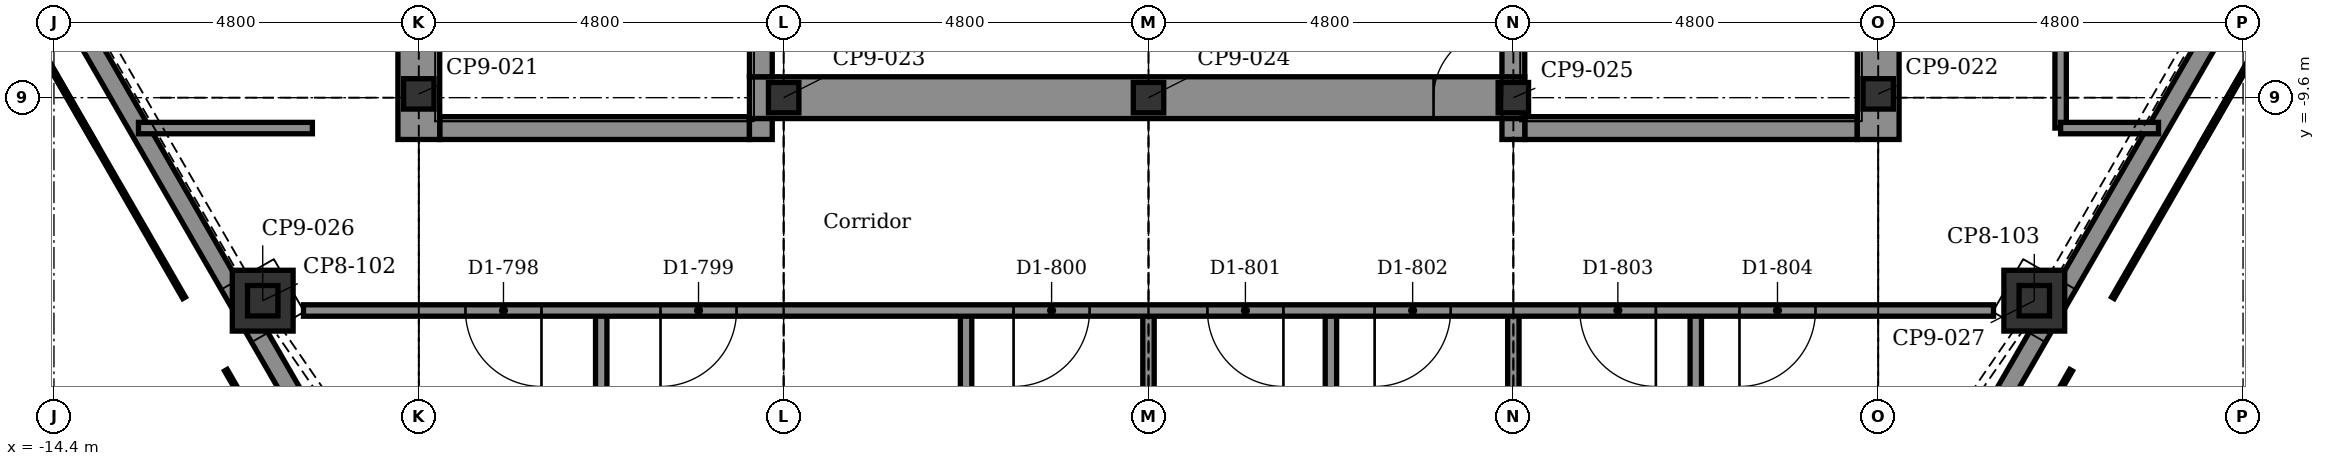
"""IFC4 building model, lengths in metres.
Left out: names, types, materials, properties, quantities, classifications, styles, units other than length and angle.
Written with IfcOpenShell. Run it as: python <this file> out.ifc"""

import sys

from ifc_helpers import new_model, si_unit, direction, frame, frame_2d, origin, origin_2d, place, context, subcontext, project, spatial, polyline, rectangle, hollow_rectangle, outline, extrude, element, fill, save


model = new_model("IFC4")
c1 = context("Model", 3, precision=1e-05, world=origin(), true_north=direction((0.0, 1.0)))
c2 = subcontext(c1, "Body", "Model", "MODEL_VIEW")
j1 = project(units=[si_unit("LENGTHUNIT", "METRE"), si_unit("PLANEANGLEUNIT", "RADIAN")], contexts=[c1])
p1 = place(None, origin())
s1 = spatial("IfcSite", under=j1, at=p1, CompositionType="ELEMENT")
p2 = place(p1, origin())
s2 = spatial("IfcBuilding", under=s1, at=p2, CompositionType="ELEMENT")
p3 = place(p2, frame((0.0, 0.0, 301.9)))
s3 = spatial("IfcBuildingStorey", under=s2, at=p3, CompositionType="ELEMENT", Elevation=301.9)
for number, where, z_axis, x_axis in (
    (1, (11.654, -12.271, -0.3), (0.0, 0.0, 1.0), (0.5, 0.866, 0.0)),
    (2, (-11.654, -12.271, -0.3), (0.0, 0.0, 1.0), (0.866, 0.5, 0.0)),
):
    element("IfcColumn", number, at=place(p3, frame(where, z_axis=z_axis, x_axis=x_axis)), inside=s3, PredefinedType="COLUMN", context=c2, shape_type="SweptSolid", body=[
        extrude(rectangle(XDim=0.8, YDim=0.8, at=origin_2d()), origin(), (0.0, 0.0, 1.0), 5.3),
    ])
p4 = place(p3, frame((-9.325, -10.0, -0.3), z_axis=(0.0, 0.0, 1.0), x_axis=(1.0, 0.0, 0.0)))
e3 = element("IfcWall", 3, at=p4, inside=s3, PredefinedType="STANDARD", context=c2, shape_type="SweptSolid", body=[
    extrude(rectangle(XDim=4.075, YDim=0.3, at=frame_2d((2.038, 0.0))), origin(), (0.0, 0.0, 1.0), 5.3),
])
p5 = place(p3, frame((4.95, -10.0, -0.3), z_axis=(0.0, 0.0, 1.0), x_axis=(1.0, 0.0, 0.0)))
e4 = element("IfcWall", 4, at=p5, inside=s3, PredefinedType="STANDARD", context=c2, shape_type="SweptSolid", body=[
    extrude(rectangle(XDim=4.375, YDim=0.3, at=frame_2d((2.188, 0.0))), origin(), (0.0, 0.0, 1.0), 5.3),
])
p6 = place(p3, frame((-5.25, -9.6, -0.3), z_axis=(0.0, 0.0, 1.0), x_axis=(1.0, 0.0, 0.0)))
e5 = element("IfcWall", 5, at=p6, inside=s3, PredefinedType="SHEAR", context=c2, shape_type="SweptSolid", body=[
    extrude(rectangle(XDim=10.2, YDim=0.55, at=frame_2d((5.1, 0.0))), origin(), (0.0, 0.0, 1.0), 5.3),
])
p7 = place(p6, frame((9.0, 0.0, 0.3)))
e6 = element("IfcOpeningElement", 6, at=p7, cuts=e5, PredefinedType="OPENING", context=c2, shape_type="SweptSolid", body=[
    extrude(rectangle(XDim=0.9, YDim=2.1, at=frame_2d((0.45, 1.05))), frame((0.0, 0.285, 0.0), z_axis=(0.0, -1.0, 0.0), x_axis=(1.0, 0.0, 0.0)), (0.0, 0.0, 1.0), 0.57),
])
p8 = place(p3, frame((-9.6, -10.15, -0.3), z_axis=(0.0, 0.0, 1.0), x_axis=(0.0, 1.0, 0.0)))
e7 = element("IfcWall", 7, at=p8, inside=s3, PredefinedType="SHEAR", context=c2, shape_type="SweptSolid", body=[
    extrude(rectangle(XDim=7.6, YDim=0.55, at=frame_2d((3.8, 0.0))), origin(), (0.0, 0.0, 1.0), 5.3),
])
p9 = place(p3, frame((-5.1, -10.15, -0.3), z_axis=(0.0, 0.0, 1.0), x_axis=(0.0, 1.0, 0.0)))
e8 = element("IfcWall", 8, at=p9, inside=s3, PredefinedType="STANDARD", context=c2, shape_type="SweptSolid", body=[
    extrude(rectangle(XDim=0.275, YDim=0.3, at=frame_2d((0.137, 0.0))), origin(), (0.0, 0.0, 1.0), 5.3),
])
p10 = place(p3, frame((-5.1, -9.325, -0.3), z_axis=(0.0, 0.0, 1.0), x_axis=(0.0, 1.0, 0.0)))
e9 = element("IfcWall", 9, at=p10, inside=s3, PredefinedType="STANDARD", context=c2, shape_type="SweptSolid", body=[
    extrude(rectangle(XDim=7.075, YDim=0.3, at=frame_2d((3.538, 0.0))), origin(), (0.0, 0.0, 1.0), 5.3),
])
p11 = place(p10, frame((3.875, 0.0, 0.3)))
e10 = element("IfcOpeningElement", 10, at=p11, cuts=e9, PredefinedType="OPENING", context=c2, shape_type="SweptSolid", body=[
    extrude(rectangle(XDim=1.2, YDim=2.1, at=frame_2d((0.6, 1.05))), frame((0.0, 0.16, 0.0), z_axis=(0.0, -1.0, 0.0), x_axis=(1.0, 0.0, 0.0)), (0.0, 0.0, 1.0), 0.32),
])
p12 = place(p3, frame((4.8, -10.15, -0.3), z_axis=(0.0, 0.0, 1.0), x_axis=(0.0, 1.0, 0.0)))
e11 = element("IfcWall", 11, at=p12, inside=s3, PredefinedType="STANDARD", context=c2, shape_type="SweptSolid", body=[
    extrude(rectangle(XDim=0.275, YDim=0.3, at=frame_2d((0.137, 0.0))), origin(), (0.0, 0.0, 1.0), 5.3),
])
p13 = place(p3, frame((4.8, -9.325, -0.3), z_axis=(0.0, 0.0, 1.0), x_axis=(0.0, 1.0, 0.0)))
e12 = element("IfcWall", 12, at=p13, inside=s3, PredefinedType="STANDARD", context=c2, shape_type="SweptSolid", body=[
    extrude(rectangle(XDim=7.075, YDim=0.3, at=frame_2d((3.538, 0.0))), origin(), (0.0, 0.0, 1.0), 5.3),
])
p14 = place(p13, frame((3.875, 0.0, 0.3)))
e13 = element("IfcOpeningElement", 13, at=p14, cuts=e12, PredefinedType="OPENING", context=c2, shape_type="SweptSolid", body=[
    extrude(rectangle(XDim=1.2, YDim=2.1, at=frame_2d((0.6, 1.05))), frame((0.0, 0.16, 0.0), z_axis=(0.0, -1.0, 0.0), x_axis=(1.0, 0.0, 0.0)), (0.0, 0.0, 1.0), 0.32),
])
p15 = place(p3, frame((9.6, -10.15, -0.3), z_axis=(0.0, 0.0, 1.0), x_axis=(0.0, 1.0, 0.0)))
e14 = element("IfcWall", 14, at=p15, inside=s3, PredefinedType="SHEAR", context=c2, shape_type="SweptSolid", body=[
    extrude(rectangle(XDim=20.075, YDim=0.55, at=frame_2d((10.038, 0.0))), origin(), (0.0, 0.0, 1.0), 5.3),
])
for number, where, z_axis, x_axis in (
    (15, (11.654, -12.271, 5.0), (0.0, 0.0, 1.0), (1.0, 0.0, 0.0)),
    (16, (-11.654, -12.271, 5.0), (0.0, 0.0, 1.0), (1.0, 0.0, 0.0)),
):
    element("IfcColumn", number, at=place(p3, frame(where, z_axis=z_axis, x_axis=x_axis)), inside=s3, PredefinedType="COLUMN", context=c2, shape_type="SweptSolid", body=[
        extrude(hollow_rectangle(XDim=0.4, YDim=0.4, WallThickness=0.02, at=origin_2d()), origin(), (0.0, 0.0, 1.0), 2.178),
    ])
p16 = place(p3, frame((-9.6, -9.55, 5.0), z_axis=(0.0, 0.0, 1.0), x_axis=(1.0, 0.0, 0.0)))
e17 = element("IfcColumn", 17, at=p16, inside=s3, PredefinedType="COLUMN", context=c2, shape_type="SweptSolid", body=[
    extrude(hollow_rectangle(XDim=0.4, YDim=0.4, WallThickness=0.02, at=origin_2d()), origin(), (0.0, 0.0, 1.0), 3.774),
])
for number, where, z_axis, x_axis in (
    (18, (-4.8, -9.6, 5.0), (0.0, 0.0, 1.0), (1.0, 0.0, 0.0)),
    (19, (0.0, -9.6, 5.0), (0.0, 0.0, 1.0), (1.0, 0.0, 0.0)),
    (20, (4.8, -9.6, 5.0), (0.0, 0.0, 1.0), (1.0, 0.0, 0.0)),
):
    element("IfcColumn", number, at=place(p3, frame(where, z_axis=z_axis, x_axis=x_axis)), inside=s3, PredefinedType="COLUMN", context=c2, shape_type="SweptSolid", body=[
        extrude(hollow_rectangle(XDim=0.4, YDim=0.4, WallThickness=0.02, at=origin_2d()), origin(), (0.0, 0.0, 1.0), 2.917),
    ])
p17 = place(p3, frame((9.6, -9.55, 5.0), z_axis=(0.0, 0.0, 1.0), x_axis=(1.0, 0.0, 0.0)))
e21 = element("IfcColumn", 21, at=p17, inside=s3, PredefinedType="COLUMN", context=c2, shape_type="SweptSolid", body=[
    extrude(hollow_rectangle(XDim=0.4, YDim=0.4, WallThickness=0.02, at=origin_2d()), origin(), (0.0, 0.0, 1.0), 3.774),
])
p18 = place(p3, frame((18.226, -1.438, 0.0), z_axis=(0.0, 0.0, 1.0), x_axis=(-0.500010301671, -0.86601945603, 0.0)))
e22 = element("IfcWall", 22, at=p18, inside=s3, PredefinedType="SOLIDWALL", context=c2, shape_type="SweptSolid", body=[
    extrude(outline(polyline([(0.0, 0.0), (15.736, 0.0), (15.736, 5.682), (0.0, 14.197), (0.0, 0.0)])), frame((0.0, 0.125, 0.0), z_axis=(0.0, -1.0, 0.0), x_axis=(1.0, 0.0, 0.0)), (0.0, 0.0, 1.0), 0.25),
])
p19 = place(p18, frame((4.268, 0.0, 5.8)))
e23 = element("IfcOpeningElement", 23, at=p19, cuts=e22, PredefinedType="OPENING", context=c2, shape_type="SweptSolid", body=[
    extrude(rectangle(XDim=2.4, YDim=3.6, at=frame_2d((1.2, 1.8))), frame((0.0, 0.135, 0.0), z_axis=(0.0, -1.0, 0.0), x_axis=(1.0, 0.0, 0.0)), (0.0, 0.0, 1.0), 0.27),
])
p20 = place(p18, frame((4.268, 0.0, 1.0)))
e24 = element("IfcOpeningElement", 24, at=p20, cuts=e22, PredefinedType="OPENING", context=c2, shape_type="SweptSolid", body=[
    extrude(rectangle(XDim=2.4, YDim=3.0, at=frame_2d((1.2, 1.5))), frame((0.0, 0.135, 0.0), z_axis=(0.0, -1.0, 0.0), x_axis=(1.0, 0.0, 0.0)), (0.0, 0.0, 1.0), 0.27),
])
p21 = place(p3, frame((-10.358, -15.065, 0.0), z_axis=(0.0, 0.0, 1.0), x_axis=(-0.500010301671, 0.86601945603, 0.0)))
e25 = element("IfcWall", 25, at=p21, inside=s3, PredefinedType="SOLIDWALL", context=c2, shape_type="SweptSolid", body=[
    extrude(outline(polyline([(0.0, 0.0), (15.736, 0.0), (15.736, 14.197), (0.0, 5.682), (0.0, 0.0)])), frame((0.0, 0.125, 0.0), z_axis=(0.0, -1.0, 0.0), x_axis=(1.0, 0.0, 0.0)), (0.0, 0.0, 1.0), 0.25),
])
p22 = place(p21, frame((9.068, 0.0, 5.8)))
e26 = element("IfcOpeningElement", 26, at=p22, cuts=e25, PredefinedType="OPENING", context=c2, shape_type="SweptSolid", body=[
    extrude(rectangle(XDim=2.4, YDim=3.6, at=frame_2d((1.2, 1.8))), frame((0.0, 0.135, 0.0), z_axis=(0.0, -1.0, 0.0), x_axis=(1.0, 0.0, 0.0)), (0.0, 0.0, 1.0), 0.27),
])
p23 = place(p21, frame((9.068, 0.0, 1.0)))
e27 = element("IfcOpeningElement", 27, at=p23, cuts=e25, PredefinedType="OPENING", context=c2, shape_type="SweptSolid", body=[
    extrude(rectangle(XDim=2.4, YDim=3.0, at=frame_2d((1.2, 1.5))), frame((0.0, 0.135, 0.0), z_axis=(0.0, -1.0, 0.0), x_axis=(1.0, 0.0, 0.0)), (0.0, 0.0, 1.0), 0.27),
])
p24 = place(p3, frame((12.0, -10.0, 0.0), z_axis=(0.0, 0.0, 1.0), x_axis=(0.0, 1.0, 0.0)))
e28 = element("IfcWall", 28, at=p24, inside=s3, PredefinedType="PARTITIONING", context=c2, shape_type="SweptSolid", body=[
    extrude(rectangle(XDim=20.0, YDim=0.15, at=frame_2d((10.0, 0.0))), origin(), (0.0, 0.0, 1.0), 5.0),
])
p25 = place(p24, frame((9.5, 0.0, 0.0)))
e29 = element("IfcOpeningElement", 29, at=p25, cuts=e28, PredefinedType="OPENING", context=c2, shape_type="SweptSolid", body=[
    extrude(rectangle(XDim=1.0, YDim=2.1, at=frame_2d((0.5, 1.05))), frame((0.0, 0.085, 0.0), z_axis=(0.0, -1.0, 0.0), x_axis=(1.0, 0.0, 0.0)), (0.0, 0.0, 1.0), 0.17),
])
p26 = place(p3, frame((7.2, -16.458, 0.0), z_axis=(0.0, 0.0, 1.0), x_axis=(0.0, 1.0, 0.0)))
e30 = element("IfcWall", 30, at=p26, inside=s3, PredefinedType="PARTITIONING", context=c2, shape_type="SweptSolid", body=[
    extrude(rectangle(XDim=4.058, YDim=0.15, at=frame_2d((2.029, 0.0))), origin(), (0.0, 0.0, 1.0), 5.0),
])
p27 = place(p3, frame((4.8, -15.828, 0.0), z_axis=(0.0, 0.0, 1.0), x_axis=(0.0, 1.0, 0.0)))
e31 = element("IfcWall", 31, at=p27, inside=s3, PredefinedType="PARTITIONING", context=c2, shape_type="SweptSolid", body=[
    extrude(rectangle(XDim=3.428, YDim=0.15, at=frame_2d((1.714, 0.0))), origin(), (0.0, 0.0, 1.0), 5.0),
])
p28 = place(p3, frame((2.4, -16.458, 0.0), z_axis=(0.0, 0.0, 1.0), x_axis=(0.0, 1.0, 0.0)))
e32 = element("IfcWall", 32, at=p28, inside=s3, PredefinedType="PARTITIONING", context=c2, shape_type="SweptSolid", body=[
    extrude(rectangle(XDim=4.058, YDim=0.15, at=frame_2d((2.029, 0.0))), origin(), (0.0, 0.0, 1.0), 5.0),
])
p29 = place(p3, frame((0.0, -15.828, 0.0), z_axis=(0.0, 0.0, 1.0), x_axis=(0.0, 1.0, 0.0)))
e33 = element("IfcWall", 33, at=p29, inside=s3, PredefinedType="PARTITIONING", context=c2, shape_type="SweptSolid", body=[
    extrude(rectangle(XDim=3.428, YDim=0.15, at=frame_2d((1.714, 0.0))), origin(), (0.0, 0.0, 1.0), 5.0),
])
for number, where, z_axis, x_axis in (
    (34, (-2.4, -16.458, 0.0), (0.0, 0.0, 1.0), (0.0, 1.0, 0.0)),
    (35, (-7.2, -16.458, 0.0), (0.0, 0.0, 1.0), (0.0, 1.0, 0.0)),
):
    element("IfcWall", number, at=place(p3, frame(where, z_axis=z_axis, x_axis=x_axis)), inside=s3, PredefinedType="PARTITIONING", context=c2, shape_type="SweptSolid", body=[
        extrude(rectangle(XDim=4.058, YDim=0.15, at=frame_2d((2.029, 0.0))), origin(), (0.0, 0.0, 1.0), 5.0),
    ])
p30 = place(p3, frame((-11.117, -12.4, 0.0), z_axis=(0.0, 0.0, 1.0), x_axis=(1.0, 0.0, 0.0)))
e36 = element("IfcWall", 36, at=p30, inside=s3, PredefinedType="PARTITIONING", context=c2, shape_type="SweptSolid", body=[
    extrude(rectangle(XDim=22.234, YDim=0.15, at=frame_2d((11.117, 0.0))), origin(), (0.0, 0.0, 1.0), 5.0),
])
p31 = place(p30, frame((2.131, 0.0, 0.0)))
e37 = element("IfcOpeningElement", 37, at=p31, cuts=e36, PredefinedType="OPENING", context=c2, shape_type="SweptSolid", body=[
    extrude(rectangle(XDim=1.0, YDim=2.1, at=frame_2d((0.5, 1.05))), frame((0.0, 0.085, 0.0), z_axis=(0.0, -1.0, 0.0), x_axis=(1.0, 0.0, 0.0)), (0.0, 0.0, 1.0), 0.17),
])
p32 = place(p30, frame((4.697, 0.0, 0.0)))
e38 = element("IfcOpeningElement", 38, at=p32, cuts=e36, PredefinedType="OPENING", context=c2, shape_type="SweptSolid", body=[
    extrude(rectangle(XDim=1.0, YDim=2.1, at=frame_2d((0.5, 1.05))), frame((0.0, 0.085, 0.0), z_axis=(0.0, -1.0, 0.0), x_axis=(1.0, 0.0, 0.0)), (0.0, 0.0, 1.0), 0.17),
])
p33 = place(p30, frame((9.342, 0.0, 0.0)))
e39 = element("IfcOpeningElement", 39, at=p33, cuts=e36, PredefinedType="OPENING", context=c2, shape_type="SweptSolid", body=[
    extrude(rectangle(XDim=1.0, YDim=2.1, at=frame_2d((0.5, 1.05))), frame((0.0, 0.085, 0.0), z_axis=(0.0, -1.0, 0.0), x_axis=(1.0, 0.0, 0.0)), (0.0, 0.0, 1.0), 0.17),
])
p34 = place(p30, frame((11.892, 0.0, 0.0)))
e40 = element("IfcOpeningElement", 40, at=p34, cuts=e36, PredefinedType="OPENING", context=c2, shape_type="SweptSolid", body=[
    extrude(rectangle(XDim=1.0, YDim=2.1, at=frame_2d((0.5, 1.05))), frame((0.0, 0.085, 0.0), z_axis=(0.0, -1.0, 0.0), x_axis=(1.0, 0.0, 0.0)), (0.0, 0.0, 1.0), 0.17),
])
p35 = place(p30, frame((14.092, 0.0, 0.0)))
e41 = element("IfcOpeningElement", 41, at=p35, cuts=e36, PredefinedType="OPENING", context=c2, shape_type="SweptSolid", body=[
    extrude(rectangle(XDim=1.0, YDim=2.1, at=frame_2d((0.5, 1.05))), frame((0.0, 0.085, 0.0), z_axis=(0.0, -1.0, 0.0), x_axis=(1.0, 0.0, 0.0)), (0.0, 0.0, 1.0), 0.17),
])
p36 = place(p30, frame((16.792, 0.0, 0.0)))
e42 = element("IfcOpeningElement", 42, at=p36, cuts=e36, PredefinedType="OPENING", context=c2, shape_type="SweptSolid", body=[
    extrude(rectangle(XDim=1.0, YDim=2.1, at=frame_2d((0.5, 1.05))), frame((0.0, 0.085, 0.0), z_axis=(0.0, -1.0, 0.0), x_axis=(1.0, 0.0, 0.0)), (0.0, 0.0, 1.0), 0.17),
])
p37 = place(p30, frame((18.892, 0.0, 0.0)))
e43 = element("IfcOpeningElement", 43, at=p37, cuts=e36, PredefinedType="OPENING", context=c2, shape_type="SweptSolid", body=[
    extrude(rectangle(XDim=1.0, YDim=2.1, at=frame_2d((0.5, 1.05))), frame((0.0, 0.085, 0.0), z_axis=(0.0, -1.0, 0.0), x_axis=(1.0, 0.0, 0.0)), (0.0, 0.0, 1.0), 0.17),
])
p38 = place(p3, frame((-13.288, -10.0, 0.0), z_axis=(0.0, 0.0, 1.0), x_axis=(1.0, 0.0, 0.0)))
e44 = element("IfcWall", 44, at=p38, inside=s3, PredefinedType="PARTITIONING", context=c2, shape_type="SweptSolid", body=[
    extrude(rectangle(XDim=2.288, YDim=0.15, at=frame_2d((1.144, 0.0))), origin(), (0.0, 0.0, 1.0), 5.0),
])
p39 = place(p3, frame((12.0, -10.0, 0.0), z_axis=(0.0, 0.0, 1.0), x_axis=(1.0, 0.0, 0.0)))
e45 = element("IfcWall", 45, at=p39, inside=s3, PredefinedType="PARTITIONING", context=c2, shape_type="SweptSolid", body=[
    extrude(rectangle(XDim=1.288, YDim=0.15, at=frame_2d((0.644, 0.0))), origin(), (0.0, 0.0, 1.0), 5.0),
])
p40 = place(p31, frame((1.0, 0.0, 0.0), z_axis=(0.0, 0.0, 1.0), x_axis=(-1.0, 0.0, 0.0)))
e46 = element("IfcDoor", 46, at=p40, inside=s3, OperationType="SINGLE_SWING_RIGHT", PredefinedType="DOOR", context=c2, shape_type="SweptSolid", body=[
    extrude(rectangle(XDim=1.0, YDim=2.1, at=frame_2d((0.5, 1.05))), frame((0.0, 0.025, 0.0), z_axis=(0.0, -1.0, 0.0), x_axis=(1.0, 0.0, 0.0)), (0.0, 0.0, 1.0), 0.05),
])
fill(e37, e46)
p41 = place(p32, frame((1.0, 0.0, 0.0), z_axis=(0.0, 0.0, 1.0), x_axis=(-1.0, 0.0, 0.0)))
e47 = element("IfcDoor", 47, at=p41, inside=s3, OperationType="SINGLE_SWING_LEFT", PredefinedType="DOOR", context=c2, shape_type="SweptSolid", body=[
    extrude(rectangle(XDim=1.0, YDim=2.1, at=frame_2d((0.5, 1.05))), frame((0.0, 0.025, 0.0), z_axis=(0.0, -1.0, 0.0), x_axis=(1.0, 0.0, 0.0)), (0.0, 0.0, 1.0), 0.05),
])
fill(e38, e47)
p42 = place(p33, frame((1.0, 0.0, 0.0), z_axis=(0.0, 0.0, 1.0), x_axis=(-1.0, 0.0, 0.0)))
e48 = element("IfcDoor", 48, at=p42, inside=s3, OperationType="SINGLE_SWING_LEFT", PredefinedType="DOOR", context=c2, shape_type="SweptSolid", body=[
    extrude(rectangle(XDim=1.0, YDim=2.1, at=frame_2d((0.5, 1.05))), frame((0.0, 0.025, 0.0), z_axis=(0.0, -1.0, 0.0), x_axis=(1.0, 0.0, 0.0)), (0.0, 0.0, 1.0), 0.05),
])
fill(e39, e48)
p43 = place(p34, frame((1.0, 0.0, 0.0), z_axis=(0.0, 0.0, 1.0), x_axis=(-1.0, 0.0, 0.0)))
e49 = element("IfcDoor", 49, at=p43, inside=s3, OperationType="SINGLE_SWING_RIGHT", PredefinedType="DOOR", context=c2, shape_type="SweptSolid", body=[
    extrude(rectangle(XDim=1.0, YDim=2.1, at=frame_2d((0.5, 1.05))), frame((0.0, 0.025, 0.0), z_axis=(0.0, -1.0, 0.0), x_axis=(1.0, 0.0, 0.0)), (0.0, 0.0, 1.0), 0.05),
])
fill(e40, e49)
p44 = place(p35, frame((1.0, 0.0, 0.0), z_axis=(0.0, 0.0, 1.0), x_axis=(-1.0, 0.0, 0.0)))
e50 = element("IfcDoor", 50, at=p44, inside=s3, OperationType="SINGLE_SWING_LEFT", PredefinedType="DOOR", context=c2, shape_type="SweptSolid", body=[
    extrude(rectangle(XDim=1.0, YDim=2.1, at=frame_2d((0.5, 1.05))), frame((0.0, 0.025, 0.0), z_axis=(0.0, -1.0, 0.0), x_axis=(1.0, 0.0, 0.0)), (0.0, 0.0, 1.0), 0.05),
])
fill(e41, e50)
p45 = place(p36, frame((1.0, 0.0, 0.0), z_axis=(0.0, 0.0, 1.0), x_axis=(-1.0, 0.0, 0.0)))
e51 = element("IfcDoor", 51, at=p45, inside=s3, OperationType="SINGLE_SWING_RIGHT", PredefinedType="DOOR", context=c2, shape_type="SweptSolid", body=[
    extrude(rectangle(XDim=1.0, YDim=2.1, at=frame_2d((0.5, 1.05))), frame((0.0, 0.025, 0.0), z_axis=(0.0, -1.0, 0.0), x_axis=(1.0, 0.0, 0.0)), (0.0, 0.0, 1.0), 0.05),
])
fill(e42, e51)
p46 = place(p37, frame((1.0, 0.0, 0.0), z_axis=(0.0, 0.0, 1.0), x_axis=(-1.0, 0.0, 0.0)))
e52 = element("IfcDoor", 52, at=p46, inside=s3, OperationType="SINGLE_SWING_LEFT", PredefinedType="DOOR", context=c2, shape_type="SweptSolid", body=[
    extrude(rectangle(XDim=1.0, YDim=2.1, at=frame_2d((0.5, 1.05))), frame((0.0, 0.025, 0.0), z_axis=(0.0, -1.0, 0.0), x_axis=(1.0, 0.0, 0.0)), (0.0, 0.0, 1.0), 0.05),
])
fill(e43, e52)
p47 = place(p7, origin())
e53 = element("IfcDoor", 53, at=p47, inside=s3, OperationType="SINGLE_SWING_RIGHT", PredefinedType="DOOR", context=c2, shape_type="SweptSolid", body=[
    extrude(rectangle(XDim=0.9, YDim=2.1, at=frame_2d((0.45, 1.05))), frame((0.0, 0.025, 0.0), z_axis=(0.0, -1.0, 0.0), x_axis=(1.0, 0.0, 0.0)), (0.0, 0.0, 1.0), 0.05),
])
fill(e6, e53)
save(model, sys.argv[1])
